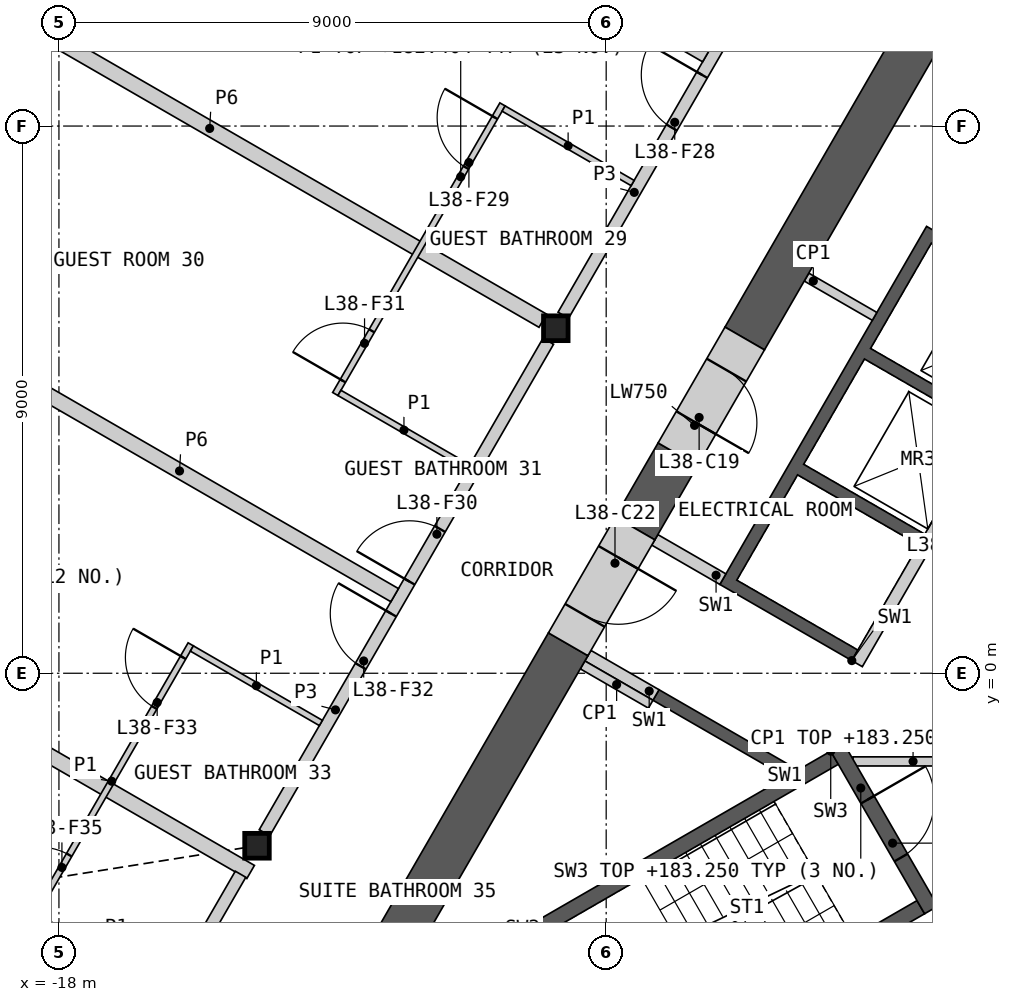
"""IFC4 building model, lengths in metres.
Left out: names, types, materials, properties, quantities, classifications, styles, units other than length and angle.
Written with IfcOpenShell. Run it as: python <this file> out.ifc"""

import sys

from ifc_helpers import new_model, si_unit, direction, frame, frame_2d, origin, origin_2d, place, context, subcontext, project, spatial, polyline, rectangle, i_section, outline, extrude, element, fill, save


model = new_model("IFC4")
c1 = context("Model", 3, precision=1e-05, world=origin(), true_north=direction((0.0, 1.0)))
c2 = subcontext(c1, "Body", "Model", "MODEL_VIEW")
j1 = project(units=[si_unit("LENGTHUNIT", "METRE"), si_unit("PLANEANGLEUNIT", "RADIAN")], contexts=[c1])
p1 = place(None, origin())
s1 = spatial("IfcSite", under=j1, at=p1, CompositionType="ELEMENT")
p2 = place(p1, origin())
s2 = spatial("IfcBuilding", under=s1, at=p2, CompositionType="ELEMENT")
p3 = place(p2, frame((0.0, 0.0, 180.0)))
s3 = spatial("IfcBuildingStorey", under=s2, at=p3, CompositionType="ELEMENT", Elevation=180.0)
for number, where, z_axis, x_axis in (
    (1, (-9.828, 5.675, 0.0), (0.0, 0.0, 1.0), (1.0, 0.0, 0.0)),
    (2, (-14.743, -2.837, 0.0), (0.0, 0.0, 1.0), (1.0, 0.0, 0.0)),
):
    element("IfcColumn", number, at=place(p3, frame(where, z_axis=z_axis, x_axis=x_axis)), inside=s3, PredefinedType="COLUMN", context=c2, shape_type="SweptSolid", body=[
        extrude(i_section(OverallWidth=0.404, OverallDepth=0.407, WebThickness=0.027, FlangeThickness=0.044, at=origin_2d()), origin(), (0.0, 0.0, 1.0), 3.6),
    ])
p4 = place(p3, origin())
e3 = element("IfcWall", 3, at=p4, inside=s3, PredefinedType="SHEAR", context=c2, shape_type="SweptSolid", body=[
    extrude(outline(polyline([(-6.061, -1.697), (-8.231, -0.444), (-8.131, -0.271), (-5.96, -1.524), (-6.061, -1.697)])), origin(), (0.0, 0.0, 1.0), 3.25),
])
p5 = place(p3, origin())
e4 = element("IfcWall", 4, at=p5, inside=s3, PredefinedType="SHEAR", context=c2, shape_type="SweptSolid", body=[
    extrude(outline(polyline([(-4.96, 0.208), (-7.131, 1.461), (-3.731, 7.35), (-1.561, 6.097), (-1.66, 5.924), (-3.652, 7.074), (-4.652, 5.342), (-2.66, 4.192), (-2.76, 4.019), (-4.752, 5.169), (-5.752, 3.437), (-3.76, 2.287), (-3.861, 2.113), (-5.852, 3.263), (-6.852, 1.531), (-4.861, 0.381), (-4.96, 0.208)])), origin(), (0.0, 0.0, 1.0), 3.25),
])
p6 = place(p3, frame((-1.631, 5.776, 0.0), z_axis=(0.0, 0.0, 1.0), x_axis=(-0.499992876559, -0.866029516466, 0.0)))
e5 = element("IfcWall", 5, at=p6, inside=s3, PredefinedType="SOLIDWALL", context=c2, shape_type="SweptSolid", body=[
    extrude(rectangle(XDim=6.486, YDim=0.2, at=frame_2d((3.243, 0.0))), origin(), (0.0, 0.0, 1.0), 3.25),
])
p7 = place(p6, frame((0.337, 0.0, 0.0)))
e6 = element("IfcOpeningElement", 6, at=p7, cuts=e5, PredefinedType="OPENING", context=c2, shape_type="SweptSolid", body=[
    extrude(rectangle(XDim=1.1, YDim=2.1, at=frame_2d((0.55, 1.05))), frame((0.0, 0.11, 0.0), z_axis=(0.0, -1.0, 0.0), x_axis=(1.0, 0.0, 0.0)), (0.0, 0.0, 1.0), 0.22),
])
p8 = place(p6, frame((2.537, 0.0, 0.0)))
e7 = element("IfcOpeningElement", 7, at=p8, cuts=e5, PredefinedType="OPENING", context=c2, shape_type="SweptSolid", body=[
    extrude(rectangle(XDim=1.1, YDim=2.1, at=frame_2d((0.55, 1.05))), frame((0.0, 0.11, 0.0), z_axis=(0.0, -1.0, 0.0), x_axis=(1.0, 0.0, 0.0)), (0.0, 0.0, 1.0), 0.22),
])
for number, where, z_axis, x_axis in (
    (8, (-7.081, 1.548, 0.0), (0.0, 0.0, 1.0), (-0.866, 0.5, 0.0)),
    (9, (-8.181, -0.357, 0.0), (0.0, 0.0, 1.0), (-0.866, 0.5, 0.0)),
):
    element("IfcWall", number, at=place(p3, frame(where, z_axis=z_axis, x_axis=x_axis)), inside=s3, PredefinedType="SHEAR", context=c2, shape_type="SweptSolid", body=[
        extrude(rectangle(XDim=1.293, YDim=0.2, at=frame_2d((0.646, 0.0))), origin(), (0.0, 0.0, 1.0), 3.25),
    ])
p9 = place(p3, frame((-4.941, -1.45, 0.0), z_axis=(0.0, 0.0, 1.0), x_axis=(1.0, 0.0, 0.0)))
e10 = element("IfcWall", 10, at=p9, inside=s3, PredefinedType="PARTITIONING", context=c2, shape_type="SweptSolid", body=[
    extrude(rectangle(XDim=9.882, YDim=0.15, at=frame_2d((4.941, 0.0))), origin(), (0.0, 0.0, 1.0), 3.25),
])
p10 = place(p9, frame((4.391, 0.0, 0.0)))
e11 = element("IfcOpeningElement", 11, at=p10, cuts=e10, PredefinedType="OPENING", context=c2, shape_type="SweptSolid", body=[
    extrude(rectangle(XDim=1.1, YDim=2.1, at=frame_2d((0.55, 1.05))), frame((0.0, 0.085, 0.0), z_axis=(0.0, -1.0, 0.0), x_axis=(1.0, 0.0, 0.0)), (0.0, 0.0, 1.0), 0.17),
])
p11 = place(p3, origin())
e12 = element("IfcWall", 12, at=p11, inside=s3, PredefinedType="SHEAR", context=c2, shape_type="SweptSolid", body=[
    extrude(outline(polyline([(-5.307, -1.281), (-10.374, -4.206), (-10.032, -4.298), (-5.182, -1.498), (-5.307, -1.281)])), origin(), (0.0, 0.0, 1.0), 3.25),
])
p12 = place(p3, origin())
e13 = element("IfcWall", 13, at=p12, inside=s3, PredefinedType="SHEAR", context=c2, shape_type="SweptSolid", body=[
    extrude(outline(polyline([(-8.738, -6.539), (-8.83, -6.881), (-3.763, -3.956), (-3.888, -3.739), (-8.738, -6.539)])), origin(), (0.0, 0.0, 1.0), 3.25),
])
p13 = place(p3, frame((-5.199, -1.219, 0.0), z_axis=(0.0, 0.0, 1.0), x_axis=(0.499982516597, -0.866035497597, 0.0)))
e14 = element("IfcWall", 14, at=p13, inside=s3, PredefinedType="SHEAR", context=c2, shape_type="SweptSolid", body=[
    extrude(rectangle(XDim=3.088, YDim=0.25, at=frame_2d((1.544, 0.0))), origin(), (0.0, 0.0, 1.0), 3.25),
])
p14 = place(p13, frame((0.994, 0.0, 0.0)))
e15 = element("IfcOpeningElement", 15, at=p14, cuts=e14, PredefinedType="OPENING", context=c2, shape_type="SweptSolid", body=[
    extrude(rectangle(XDim=1.1, YDim=2.1, at=frame_2d((0.55, 1.05))), frame((0.0, 0.135, 0.0), z_axis=(0.0, -1.0, 0.0), x_axis=(1.0, 0.0, 0.0)), (0.0, 0.0, 1.0), 0.27),
])
for number, where, z_axis, x_axis in (
    (16, (-8.268, -0.509, 0.0), (0.0, 0.0, 1.0), (-0.866, 0.5, 0.0)),
    (17, (-5.705, 6.516, 0.0), (0.0, 0.0, 1.0), (0.866, -0.5, 0.0)),
):
    element("IfcWall", number, at=place(p3, frame(where, z_axis=z_axis, x_axis=x_axis)), inside=s3, PredefinedType="PARTITIONING", context=c2, shape_type="SweptSolid", body=[
        extrude(rectangle(XDim=1.293, YDim=0.15, at=frame_2d((0.646, 0.0))), origin(), (0.0, 0.0, 1.0), 3.25),
    ])
p15 = place(p3, frame((-9.625, 0.477, 0.0), z_axis=(0.0, 0.0, 1.0), x_axis=(-0.499986234705, -0.866033351035, 0.0)))
e18 = element("IfcWall", 18, at=p15, inside=s3, PredefinedType="SHEAR", context=c2, shape_type="SweptSolid", body=[
    extrude(rectangle(XDim=9.801, YDim=0.75, at=frame_2d((4.9, 0.0))), origin(), (0.0, 0.0, 1.0), 3.25),
])
p16 = place(p3, frame((-2.622, 12.606, 0.0), z_axis=(0.0, 0.0, 1.0), x_axis=(-0.500014611105, -0.866016967894, 0.0)))
e19 = element("IfcWall", 19, at=p16, inside=s3, PredefinedType="SHEAR", context=c2, shape_type="SweptSolid", body=[
    extrude(rectangle(XDim=8.198, YDim=0.75, at=frame_2d((4.099, 0.0))), origin(), (0.0, 0.0, 1.0), 3.25),
])
p17 = place(p3, frame((-7.821, 3.601, 0.0), z_axis=(0.0, 0.0, 1.0), x_axis=(-0.49996263964, -0.866046972724, 0.0)))
e20 = element("IfcWall", 20, at=p17, inside=s3, PredefinedType="SHEAR", context=c2, shape_type="SweptSolid", body=[
    extrude(rectangle(XDim=1.408, YDim=0.75, at=frame_2d((0.704, 0.0))), origin(), (0.0, 0.0, 1.0), 3.25),
])
p18 = place(p3, frame((-6.721, 5.506, 0.0), z_axis=(0.0, 0.0, 1.0), x_axis=(-0.499946605688, -0.86605622881, 0.0)))
e21 = element("IfcWall", 21, at=p18, inside=s3, PredefinedType="SHEAR", context=c2, shape_type="SweptSolid", body=[
    extrude(rectangle(XDim=2.2, YDim=0.75, at=frame_2d((1.1, 0.0))), origin(), (0.0, 0.0, 1.0), 3.25),
])
p19 = place(p18, frame((0.6, 0.0, 0.0)))
e22 = element("IfcOpeningElement", 22, at=p19, cuts=e21, PredefinedType="OPENING", context=c2, shape_type="SweptSolid", body=[
    extrude(rectangle(XDim=1.0, YDim=2.1, at=frame_2d((0.5, 1.05))), frame((0.0, 0.385, 0.0), z_axis=(0.0, -1.0, 0.0), x_axis=(1.0, 0.0, 0.0)), (0.0, 0.0, 1.0), 0.77),
])
p20 = place(p3, frame((-8.525, 2.382, 0.0), z_axis=(0.0, 0.0, 1.0), x_axis=(-0.500077893725, -0.86598042715, 0.0)))
e23 = element("IfcWall", 23, at=p20, inside=s3, PredefinedType="SHEAR", context=c2, shape_type="SweptSolid", body=[
    extrude(rectangle(XDim=2.2, YDim=0.75, at=frame_2d((1.1, 0.0))), origin(), (0.0, 0.0, 1.0), 3.25),
])
p21 = place(p20, frame((0.55, 0.0, 0.0)))
e24 = element("IfcOpeningElement", 24, at=p21, cuts=e23, PredefinedType="OPENING", context=c2, shape_type="SweptSolid", body=[
    extrude(rectangle(XDim=1.1, YDim=2.1, at=frame_2d((0.55, 1.05))), frame((0.0, 0.385, 0.0), z_axis=(0.0, -1.0, 0.0), x_axis=(1.0, 0.0, 0.0)), (0.0, 0.0, 1.0), 0.77),
])
p22 = place(p3, frame((-26.164, 3.265, 0.0), z_axis=(0.0, 0.0, 1.0), x_axis=(0.866021313335, -0.500007084799, 0.0)))
e25 = element("IfcWall", 25, at=p22, inside=s3, PredefinedType="PARTITIONING", context=c2, shape_type="SweptSolid", body=[
    extrude(rectangle(XDim=13.068, YDim=0.25, at=frame_2d((6.534, 0.0))), origin(), (0.0, 0.0, 1.0), 2.404),
])
p23 = place(p3, frame((-21.0, 12.124, 0.0), z_axis=(0.0, 0.0, 1.0), x_axis=(0.866025883649, -0.499999168849, 0.0)))
e26 = element("IfcWall", 26, at=p23, inside=s3, PredefinedType="PARTITIONING", context=c2, shape_type="SweptSolid", body=[
    extrude(rectangle(XDim=12.652, YDim=0.25, at=frame_2d((6.326, 0.0))), origin(), (0.0, 0.0, 1.0), 2.404),
])
p24 = place(p3, frame((-9.705, 5.888, 0.0), z_axis=(0.0, 0.0, 1.0), x_axis=(0.50000393355, 0.866023132736, 0.0)))
e27 = element("IfcWall", 27, at=p24, inside=s3, PredefinedType="PARTITIONING", context=c2, shape_type="SweptSolid", body=[
    extrude(rectangle(XDim=9.335, YDim=0.2, at=frame_2d((4.667, 0.0))), origin(), (0.0, 0.0, 1.0), 3.25),
])
p25 = place(p24, frame((5.172, 0.0, 0.0)))
e28 = element("IfcOpeningElement", 28, at=p25, cuts=e27, PredefinedType="OPENING", context=c2, shape_type="SweptSolid", body=[
    extrude(rectangle(XDim=1.0, YDim=2.1, at=frame_2d((0.5, 1.05))), frame((0.0, 0.11, 0.0), z_axis=(0.0, -1.0, 0.0), x_axis=(1.0, 0.0, 0.0)), (0.0, 0.0, 1.0), 0.22),
])
p26 = place(p24, frame((3.565, 0.0, 0.0)))
e29 = element("IfcOpeningElement", 29, at=p26, cuts=e27, PredefinedType="OPENING", context=c2, shape_type="SweptSolid", body=[
    extrude(rectangle(XDim=1.0, YDim=2.1, at=frame_2d((0.5, 1.05))), frame((0.0, 0.11, 0.0), z_axis=(0.0, -1.0, 0.0), x_axis=(1.0, 0.0, 0.0)), (0.0, 0.0, 1.0), 0.22),
])
p27 = place(p3, frame((-14.619, -2.624, 0.0), z_axis=(0.0, 0.0, 1.0), x_axis=(0.50000393355, 0.866023132736, 0.0)))
e30 = element("IfcWall", 30, at=p27, inside=s3, PredefinedType="PARTITIONING", context=c2, shape_type="SweptSolid", body=[
    extrude(rectangle(XDim=9.335, YDim=0.2, at=frame_2d((4.667, 0.0))), origin(), (0.0, 0.0, 1.0), 3.25),
])
p28 = place(p27, frame((4.77, 0.0, 0.0)))
e31 = element("IfcOpeningElement", 31, at=p28, cuts=e30, PredefinedType="OPENING", context=c2, shape_type="SweptSolid", body=[
    extrude(rectangle(XDim=1.0, YDim=2.1, at=frame_2d((0.5, 1.05))), frame((0.0, 0.11, 0.0), z_axis=(0.0, -1.0, 0.0), x_axis=(1.0, 0.0, 0.0)), (0.0, 0.0, 1.0), 0.22),
])
p29 = place(p27, frame((3.163, 0.0, 0.0)))
e32 = element("IfcOpeningElement", 32, at=p29, cuts=e30, PredefinedType="OPENING", context=c2, shape_type="SweptSolid", body=[
    extrude(rectangle(XDim=1.0, YDim=2.1, at=frame_2d((0.5, 1.05))), frame((0.0, 0.11, 0.0), z_axis=(0.0, -1.0, 0.0), x_axis=(1.0, 0.0, 0.0)), (0.0, 0.0, 1.0), 0.22),
])
p30 = place(p3, frame((-19.555, 5.37, 0.0), z_axis=(0.0, 0.0, 1.0), x_axis=(0.866024371346, -0.500001788232, 0.0)))
e33 = element("IfcWall", 33, at=p30, inside=s3, PredefinedType="PARTITIONING", context=c2, shape_type="SweptSolid", body=[
    extrude(rectangle(XDim=8.171, YDim=0.25, at=frame_2d((4.085, 0.0))), origin(), (0.0, 0.0, 1.0), 2.404),
])
p31 = place(p3, frame((-14.39, 14.228, 0.0), z_axis=(0.0, 0.0, 1.0), x_axis=(0.866031008936, -0.499990291468, 0.0)))
e34 = element("IfcWall", 34, at=p31, inside=s3, PredefinedType="PARTITIONING", context=c2, shape_type="SweptSolid", body=[
    extrude(rectangle(XDim=8.127, YDim=0.25, at=frame_2d((4.063, 0.0))), origin(), (0.0, 0.0, 1.0), 2.404),
])
p32 = place(p3, frame((-17.744, -8.035, 0.0), z_axis=(0.0, 0.0, 1.0), x_axis=(0.49998041698, 0.866036709751, 0.0)))
e35 = element("IfcWall", 35, at=p32, inside=s3, PredefinedType="PARTITIONING", context=c2, shape_type="SweptSolid", body=[
    extrude(rectangle(XDim=5.462, YDim=0.2, at=frame_2d((2.731, 0.0))), origin(), (0.0, 0.0, 1.0), 3.25),
])
p33 = place(p32, frame((0.352, 0.0, 0.0)))
e36 = element("IfcOpeningElement", 36, at=p33, cuts=e35, PredefinedType="OPENING", context=c2, shape_type="SweptSolid", body=[
    extrude(rectangle(XDim=1.1, YDim=2.1, at=frame_2d((0.55, 1.05))), frame((0.0, 0.11, 0.0), z_axis=(0.0, -1.0, 0.0), x_axis=(1.0, 0.0, 0.0)), (0.0, 0.0, 1.0), 0.22),
])
p34 = place(p3, frame((-13.455, 4.593, 0.0), z_axis=(0.0, 0.0, 1.0), x_axis=(0.500015767406, 0.866016300277, 0.0)))
e37 = element("IfcWall", 37, at=p34, inside=s3, PredefinedType="PARTITIONING", context=c2, shape_type="SweptSolid", body=[
    extrude(rectangle(XDim=5.5, YDim=0.1, at=frame_2d((2.75, 0.0))), origin(), (0.0, 0.0, 1.0), 2.404),
])
p35 = place(p34, frame((4.3, 0.0, 0.0)))
e38 = element("IfcOpeningElement", 38, at=p35, cuts=e37, PredefinedType="OPENING", context=c2, shape_type="SweptSolid", body=[
    extrude(rectangle(XDim=0.95, YDim=2.1, at=frame_2d((0.475, 1.05))), frame((0.0, 0.06, 0.0), z_axis=(0.0, -1.0, 0.0), x_axis=(1.0, 0.0, 0.0)), (0.0, 0.0, 1.0), 0.12),
])
p36 = place(p34, frame((0.25, 0.0, 0.0)))
e39 = element("IfcOpeningElement", 39, at=p36, cuts=e37, PredefinedType="OPENING", context=c2, shape_type="SweptSolid", body=[
    extrude(rectangle(XDim=0.95, YDim=2.1, at=frame_2d((0.475, 1.05))), frame((0.0, 0.06, 0.0), z_axis=(0.0, -1.0, 0.0), x_axis=(1.0, 0.0, 0.0)), (0.0, 0.0, 1.0), 0.12),
])
p37 = place(p3, frame((-18.432, -4.028, 0.0), z_axis=(0.0, 0.0, 1.0), x_axis=(0.499992051641, 0.866029992723, 0.0)))
e40 = element("IfcWall", 40, at=p37, inside=s3, PredefinedType="PARTITIONING", context=c2, shape_type="SweptSolid", body=[
    extrude(rectangle(XDim=5.2, YDim=0.1, at=frame_2d((2.6, 0.0))), origin(), (0.0, 0.0, 1.0), 2.404),
])
p38 = place(p37, frame((4.0, 0.0, 0.0)))
e41 = element("IfcOpeningElement", 41, at=p38, cuts=e40, PredefinedType="OPENING", context=c2, shape_type="SweptSolid", body=[
    extrude(rectangle(XDim=0.95, YDim=2.1, at=frame_2d((0.475, 1.05))), frame((0.0, 0.06, 0.0), z_axis=(0.0, -1.0, 0.0), x_axis=(1.0, 0.0, 0.0)), (0.0, 0.0, 1.0), 0.12),
])
p39 = place(p37, frame((0.25, 0.0, 0.0)))
e42 = element("IfcOpeningElement", 42, at=p39, cuts=e40, PredefinedType="OPENING", context=c2, shape_type="SweptSolid", body=[
    extrude(rectangle(XDim=0.95, YDim=2.1, at=frame_2d((0.475, 1.05))), frame((0.0, 0.06, 0.0), z_axis=(0.0, -1.0, 0.0), x_axis=(1.0, 0.0, 0.0)), (0.0, 0.0, 1.0), 0.12),
])
p40 = place(p3, frame((-13.387, 4.611, 0.0), z_axis=(0.0, 0.0, 1.0), x_axis=(0.866032905446, -0.499987006516, 0.0)))
e43 = element("IfcWall", 43, at=p40, inside=s3, PredefinedType="PARTITIONING", context=c2, shape_type="SweptSolid", body=[
    extrude(rectangle(XDim=2.45, YDim=0.1, at=frame_2d((1.225, 0.0))), origin(), (0.0, 0.0, 1.0), 2.404),
])
for number, where, z_axis, x_axis in (
    (44, (-15.814, 0.407, 0.0), (0.0, 0.0, 1.0), (0.866, -0.5, 0.0)),
    (45, (-18.364, -4.01, 0.0), (0.0, 0.0, 1.0), (0.866, -0.5, 0.0)),
):
    element("IfcWall", number, at=place(p3, frame(where, z_axis=z_axis, x_axis=x_axis)), inside=s3, PredefinedType="PARTITIONING", context=c2, shape_type="SweptSolid", body=[
        extrude(rectangle(XDim=2.45, YDim=0.1, at=frame_2d((1.225, 0.0))), origin(), (0.0, 0.0, 1.0), 2.404),
    ])
p41 = place(p3, frame((-10.687, 9.288, 0.0), z_axis=(0.0, 0.0, 1.0), x_axis=(0.866032905446, -0.499987006516, 0.0)))
e46 = element("IfcWall", 46, at=p41, inside=s3, PredefinedType="PARTITIONING", context=c2, shape_type="SweptSolid", body=[
    extrude(rectangle(XDim=2.45, YDim=0.1, at=frame_2d((1.225, 0.0))), origin(), (0.0, 0.0, 1.0), 2.404),
])
p42 = place(p14, origin())
e47 = element("IfcDoor", 47, at=p42, inside=s3, OperationType="SINGLE_SWING_LEFT", PredefinedType="DOOR", context=c2, shape_type="SweptSolid", body=[
    extrude(rectangle(XDim=1.1, YDim=2.1, at=frame_2d((0.55, 1.05))), frame((0.0, 0.025, 0.0), z_axis=(0.0, -1.0, 0.0), x_axis=(1.0, 0.0, 0.0)), (0.0, 0.0, 1.0), 0.05),
])
fill(e15, e47)
p43 = place(p19, origin())
e48 = element("IfcDoor", 48, at=p43, inside=s3, OperationType="SINGLE_SWING_RIGHT", PredefinedType="DOOR", context=c2, shape_type="SweptSolid", body=[
    extrude(rectangle(XDim=1.0, YDim=2.1, at=frame_2d((0.5, 1.05))), frame((0.0, 0.13, 0.0), z_axis=(0.0, -1.0, 0.0), x_axis=(1.0, 0.0, 0.0)), (0.0, 0.0, 1.0), 0.05),
])
fill(e22, e48)
p44 = place(p21, origin())
e49 = element("IfcDoor", 49, at=p44, inside=s3, OperationType="SINGLE_SWING_LEFT", PredefinedType="DOOR", context=c2, shape_type="SweptSolid", body=[
    extrude(rectangle(XDim=1.1, YDim=2.1, at=frame_2d((0.55, 1.05))), frame((0.0, 0.13, 0.0), z_axis=(0.0, -1.0, 0.0), x_axis=(1.0, 0.0, 0.0)), (0.0, 0.0, 1.0), 0.05),
])
fill(e24, e49)
p45 = place(p26, origin())
e50 = element("IfcDoor", 50, at=p45, inside=s3, OperationType="SINGLE_SWING_RIGHT", PredefinedType="DOOR", context=c2, shape_type="SweptSolid", body=[
    extrude(rectangle(XDim=1.0, YDim=2.1, at=frame_2d((0.5, 1.05))), frame((0.0, 0.025, 0.0), z_axis=(0.0, -1.0, 0.0), x_axis=(1.0, 0.0, 0.0)), (0.0, 0.0, 1.0), 0.05),
])
fill(e29, e50)
p46 = place(p35, origin())
e51 = element("IfcDoor", 51, at=p46, inside=s3, OperationType="SINGLE_SWING_RIGHT", PredefinedType="DOOR", context=c2, shape_type="SweptSolid", body=[
    extrude(rectangle(XDim=0.95, YDim=2.1, at=frame_2d((0.475, 1.05))), frame((0.0, 0.025, 0.0), z_axis=(0.0, -1.0, 0.0), x_axis=(1.0, 0.0, 0.0)), (0.0, 0.0, 1.0), 0.05),
])
fill(e38, e51)
p47 = place(p28, origin())
e52 = element("IfcDoor", 52, at=p47, inside=s3, OperationType="SINGLE_SWING_LEFT", PredefinedType="DOOR", context=c2, shape_type="SweptSolid", body=[
    extrude(rectangle(XDim=1.0, YDim=2.1, at=frame_2d((0.5, 1.05))), frame((0.0, 0.025, 0.0), z_axis=(0.0, -1.0, 0.0), x_axis=(1.0, 0.0, 0.0)), (0.0, 0.0, 1.0), 0.05),
])
fill(e31, e52)
p48 = place(p36, origin())
e53 = element("IfcDoor", 53, at=p48, inside=s3, OperationType="SINGLE_SWING_LEFT", PredefinedType="DOOR", context=c2, shape_type="SweptSolid", body=[
    extrude(rectangle(XDim=0.95, YDim=2.1, at=frame_2d((0.475, 1.05))), frame((0.0, 0.025, 0.0), z_axis=(0.0, -1.0, 0.0), x_axis=(1.0, 0.0, 0.0)), (0.0, 0.0, 1.0), 0.05),
])
fill(e39, e53)
p49 = place(p29, origin())
e54 = element("IfcDoor", 54, at=p49, inside=s3, OperationType="SINGLE_SWING_RIGHT", PredefinedType="DOOR", context=c2, shape_type="SweptSolid", body=[
    extrude(rectangle(XDim=1.0, YDim=2.1, at=frame_2d((0.5, 1.05))), frame((0.0, 0.025, 0.0), z_axis=(0.0, -1.0, 0.0), x_axis=(1.0, 0.0, 0.0)), (0.0, 0.0, 1.0), 0.05),
])
fill(e32, e54)
p50 = place(p38, origin())
e55 = element("IfcDoor", 55, at=p50, inside=s3, OperationType="SINGLE_SWING_RIGHT", PredefinedType="DOOR", context=c2, shape_type="SweptSolid", body=[
    extrude(rectangle(XDim=0.95, YDim=2.1, at=frame_2d((0.475, 1.05))), frame((0.0, 0.025, 0.0), z_axis=(0.0, -1.0, 0.0), x_axis=(1.0, 0.0, 0.0)), (0.0, 0.0, 1.0), 0.05),
])
fill(e41, e55)
p51 = place(p39, origin())
e56 = element("IfcDoor", 56, at=p51, inside=s3, OperationType="SINGLE_SWING_LEFT", PredefinedType="DOOR", context=c2, shape_type="SweptSolid", body=[
    extrude(rectangle(XDim=0.95, YDim=2.1, at=frame_2d((0.475, 1.05))), frame((0.0, 0.025, 0.0), z_axis=(0.0, -1.0, 0.0), x_axis=(1.0, 0.0, 0.0)), (0.0, 0.0, 1.0), 0.05),
])
fill(e42, e56)
save(model, sys.argv[1])
